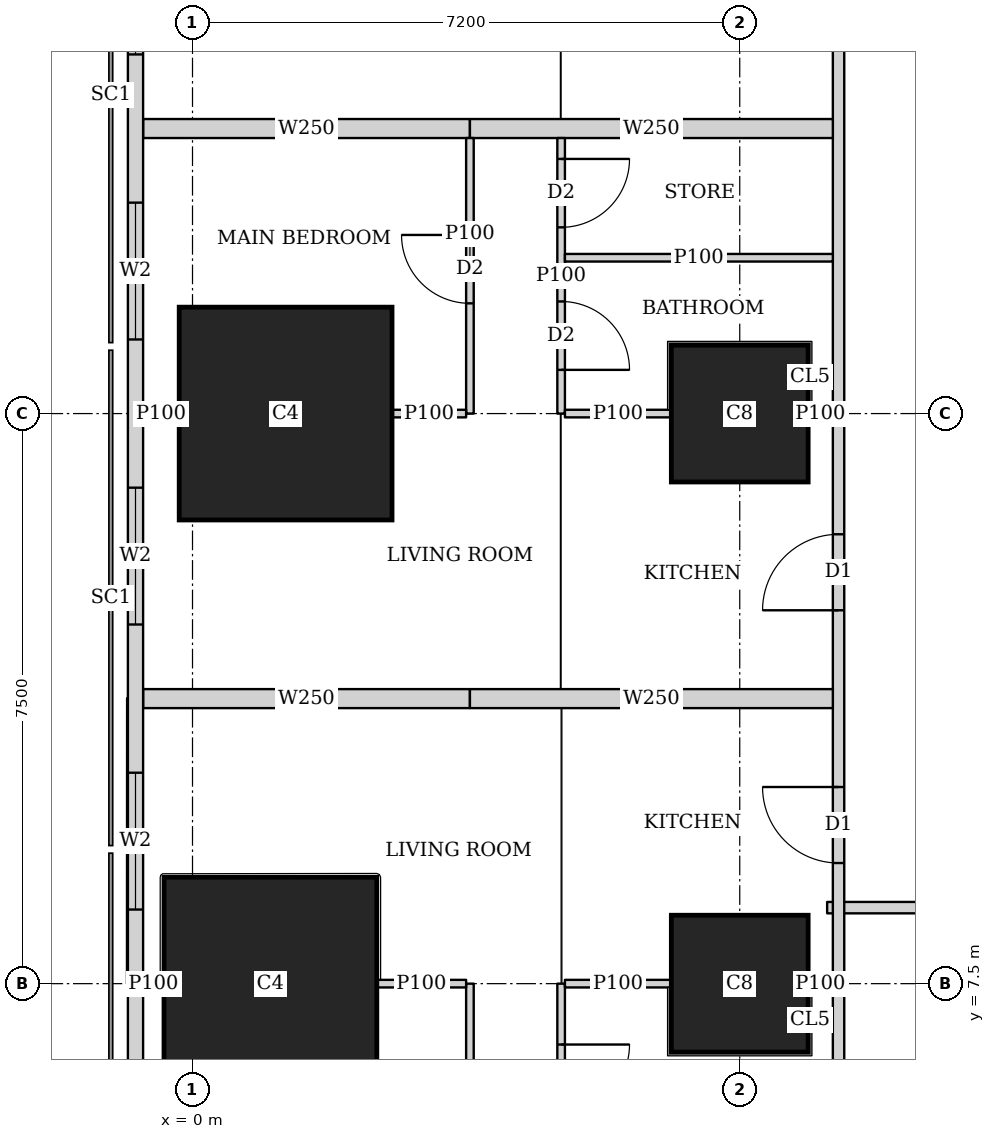
"""IFC4 building model, lengths in metres.
Left out: names, types, materials, properties, quantities, classifications, styles, units other than length and angle.
Written with IfcOpenShell. Run it as: python <this file> out.ifc"""

import sys

from ifc_helpers import new_model, si_unit, direction, frame, frame_2d, origin, origin_2d, place, context, subcontext, project, spatial, rectangle, extrude, element, fill, save


model = new_model("IFC4")
c1 = context("Model", 3, precision=1e-05, world=origin(), true_north=direction((0.0, 1.0)))
c2 = subcontext(c1, "Body", "Model", "MODEL_VIEW")
j1 = project(units=[si_unit("LENGTHUNIT", "METRE"), si_unit("PLANEANGLEUNIT", "RADIAN")], contexts=[c1])
p1 = place(None, origin())
s1 = spatial("IfcSite", under=j1, at=p1, CompositionType="ELEMENT")
p2 = place(p1, origin())
s2 = spatial("IfcBuilding", under=s1, at=p2, CompositionType="ELEMENT")
p3 = place(p2, frame((0.0, 0.0, 65.0)))
s3 = spatial("IfcBuildingStorey", under=s2, at=p3, CompositionType="ELEMENT", Elevation=65.0)
p4 = place(p3, frame((1.025, 7.5, 0.0), z_axis=(0.0, 0.0, 1.0), x_axis=(1.0, 0.0, 0.0)))
e1 = element("IfcColumn", 1, at=p4, inside=s3, PredefinedType="COLUMN", context=c2, shape_type="SweptSolid", body=[
    extrude(rectangle(XDim=2.8, YDim=2.8, at=origin_2d()), origin(), (0.0, 0.0, 1.0), 3.75),
])
p5 = place(p3, frame((7.2, 7.5, 0.0), z_axis=(0.0, 0.0, 1.0), x_axis=(1.0, 0.0, 0.0)))
e2 = element("IfcColumn", 2, at=p5, inside=s3, PredefinedType="COLUMN", context=c2, shape_type="SweptSolid", body=[
    extrude(rectangle(XDim=1.8, YDim=1.8, at=origin_2d()), origin(), (0.0, 0.0, 1.0), 3.75),
])
p6 = place(p3, frame((1.225, 15.0, 0.0), z_axis=(0.0, 0.0, 1.0), x_axis=(1.0, 0.0, 0.0)))
e3 = element("IfcColumn", 3, at=p6, inside=s3, PredefinedType="COLUMN", context=c2, shape_type="SweptSolid", body=[
    extrude(rectangle(XDim=2.8, YDim=2.8, at=origin_2d()), origin(), (0.0, 0.0, 1.0), 3.75),
])
p7 = place(p3, frame((7.2, 15.0, 0.0), z_axis=(0.0, 0.0, 1.0), x_axis=(1.0, 0.0, 0.0)))
e4 = element("IfcColumn", 4, at=p7, inside=s3, PredefinedType="COLUMN", context=c2, shape_type="SweptSolid", body=[
    extrude(rectangle(XDim=1.8, YDim=1.8, at=origin_2d()), origin(), (0.0, 0.0, 1.0), 3.75),
])
p8 = place(p3, frame((-0.75, 42.837, 0.0), z_axis=(0.0, 0.0, 1.0), x_axis=(0.0, -1.0, 0.0)))
e5 = element("IfcWall", 5, at=p8, inside=s3, PredefinedType="SOLIDWALL", context=c2, shape_type="SweptSolid", body=[
    extrude(rectangle(XDim=40.674, YDim=0.2, at=frame_2d((20.337, 0.0))), origin(), (0.0, 0.0, 1.0), 3.5),
])
p9 = place(p8, frame((1.78, 0.0, 0.9)))
e6 = element("IfcOpeningElement", 6, at=p9, cuts=e5, PredefinedType="OPENING", context=c2, shape_type="SweptSolid", body=[
    extrude(rectangle(XDim=1.8, YDim=1.5, at=frame_2d((0.9, 0.75))), frame((0.0, 0.11, 0.0), z_axis=(0.0, -1.0, 0.0), x_axis=(1.0, 0.0, 0.0)), (0.0, 0.0, 1.0), 0.22),
])
p10 = place(p8, frame((6.312, 0.0, 0.9)))
e7 = element("IfcOpeningElement", 7, at=p10, cuts=e5, PredefinedType="OPENING", context=c2, shape_type="SweptSolid", body=[
    extrude(rectangle(XDim=1.8, YDim=1.5, at=frame_2d((0.9, 0.75))), frame((0.0, 0.11, 0.0), z_axis=(0.0, -1.0, 0.0), x_axis=(1.0, 0.0, 0.0)), (0.0, 0.0, 1.0), 0.22),
])
p11 = place(p8, frame((10.062, 0.0, 0.9)))
e8 = element("IfcOpeningElement", 8, at=p11, cuts=e5, PredefinedType="OPENING", context=c2, shape_type="SweptSolid", body=[
    extrude(rectangle(XDim=1.8, YDim=1.5, at=frame_2d((0.9, 0.75))), frame((0.0, 0.11, 0.0), z_axis=(0.0, -1.0, 0.0), x_axis=(1.0, 0.0, 0.0)), (0.0, 0.0, 1.0), 0.22),
])
p12 = place(p8, frame((13.812, 0.0, 0.9)))
e9 = element("IfcOpeningElement", 9, at=p12, cuts=e5, PredefinedType="OPENING", context=c2, shape_type="SweptSolid", body=[
    extrude(rectangle(XDim=1.8, YDim=1.5, at=frame_2d((0.9, 0.75))), frame((0.0, 0.11, 0.0), z_axis=(0.0, -1.0, 0.0), x_axis=(1.0, 0.0, 0.0)), (0.0, 0.0, 1.0), 0.22),
])
p13 = place(p8, frame((17.562, 0.0, 0.9)))
e10 = element("IfcOpeningElement", 10, at=p13, cuts=e5, PredefinedType="OPENING", context=c2, shape_type="SweptSolid", body=[
    extrude(rectangle(XDim=1.8, YDim=1.5, at=frame_2d((0.9, 0.75))), frame((0.0, 0.11, 0.0), z_axis=(0.0, -1.0, 0.0), x_axis=(1.0, 0.0, 0.0)), (0.0, 0.0, 1.0), 0.22),
])
p14 = place(p8, frame((21.312, 0.0, 0.9)))
e11 = element("IfcOpeningElement", 11, at=p14, cuts=e5, PredefinedType="OPENING", context=c2, shape_type="SweptSolid", body=[
    extrude(rectangle(XDim=1.8, YDim=1.5, at=frame_2d((0.9, 0.75))), frame((0.0, 0.11, 0.0), z_axis=(0.0, -1.0, 0.0), x_axis=(1.0, 0.0, 0.0)), (0.0, 0.0, 1.0), 0.22),
])
p15 = place(p8, frame((25.062, 0.0, 0.9)))
e12 = element("IfcOpeningElement", 12, at=p15, cuts=e5, PredefinedType="OPENING", context=c2, shape_type="SweptSolid", body=[
    extrude(rectangle(XDim=1.8, YDim=1.5, at=frame_2d((0.9, 0.75))), frame((0.0, 0.11, 0.0), z_axis=(0.0, -1.0, 0.0), x_axis=(1.0, 0.0, 0.0)), (0.0, 0.0, 1.0), 0.22),
])
p16 = place(p8, frame((28.812, 0.0, 0.9)))
e13 = element("IfcOpeningElement", 13, at=p16, cuts=e5, PredefinedType="OPENING", context=c2, shape_type="SweptSolid", body=[
    extrude(rectangle(XDim=1.8, YDim=1.5, at=frame_2d((0.9, 0.75))), frame((0.0, 0.11, 0.0), z_axis=(0.0, -1.0, 0.0), x_axis=(1.0, 0.0, 0.0)), (0.0, 0.0, 1.0), 0.22),
])
p17 = place(p8, frame((32.562, 0.0, 0.9)))
e14 = element("IfcOpeningElement", 14, at=p17, cuts=e5, PredefinedType="OPENING", context=c2, shape_type="SweptSolid", body=[
    extrude(rectangle(XDim=1.8, YDim=1.5, at=frame_2d((0.9, 0.75))), frame((0.0, 0.11, 0.0), z_axis=(0.0, -1.0, 0.0), x_axis=(1.0, 0.0, 0.0)), (0.0, 0.0, 1.0), 0.22),
])
p18 = place(p8, frame((37.094, 0.0, 0.9)))
e15 = element("IfcOpeningElement", 15, at=p18, cuts=e5, PredefinedType="OPENING", context=c2, shape_type="SweptSolid", body=[
    extrude(rectangle(XDim=1.8, YDim=1.5, at=frame_2d((0.9, 0.75))), frame((0.0, 0.11, 0.0), z_axis=(0.0, -1.0, 0.0), x_axis=(1.0, 0.0, 0.0)), (0.0, 0.0, 1.0), 0.22),
])
p19 = place(p3, frame((8.5, 2.426, 0.0), z_axis=(0.0, 0.0, 1.0), x_axis=(0.0, 1.0, 0.0)))
e16 = element("IfcWall", 16, at=p19, inside=s3, PredefinedType="SOLIDWALL", context=c2, shape_type="SweptSolid", body=[
    extrude(rectangle(XDim=40.173, YDim=0.15, at=frame_2d((20.086, 0.0))), origin(), (0.0, 0.0, 1.0), 3.5),
])
p20 = place(p19, frame((6.661, 0.0, 0.0)))
e17 = element("IfcOpeningElement", 17, at=p20, cuts=e16, PredefinedType="OPENING", context=c2, shape_type="SweptSolid", body=[
    extrude(rectangle(XDim=1.0, YDim=2.1, at=frame_2d((0.5, 1.05))), frame((0.0, 0.085, 0.0), z_axis=(0.0, -1.0, 0.0), x_axis=(1.0, 0.0, 0.0)), (0.0, 0.0, 1.0), 0.17),
])
p21 = place(p19, frame((9.986, 0.0, 0.0)))
e18 = element("IfcOpeningElement", 18, at=p21, cuts=e16, PredefinedType="OPENING", context=c2, shape_type="SweptSolid", body=[
    extrude(rectangle(XDim=1.0, YDim=2.1, at=frame_2d((0.5, 1.05))), frame((0.0, 0.085, 0.0), z_axis=(0.0, -1.0, 0.0), x_axis=(1.0, 0.0, 0.0)), (0.0, 0.0, 1.0), 0.17),
])
p22 = place(p19, frame((17.487, 0.0, 0.0)))
e19 = element("IfcOpeningElement", 19, at=p22, cuts=e16, PredefinedType="OPENING", context=c2, shape_type="SweptSolid", body=[
    extrude(rectangle(XDim=1.0, YDim=2.1, at=frame_2d((0.5, 1.05))), frame((0.0, 0.085, 0.0), z_axis=(0.0, -1.0, 0.0), x_axis=(1.0, 0.0, 0.0)), (0.0, 0.0, 1.0), 0.17),
])
p23 = place(p19, frame((24.987, 0.0, 0.0)))
e20 = element("IfcOpeningElement", 20, at=p23, cuts=e16, PredefinedType="OPENING", context=c2, shape_type="SweptSolid", body=[
    extrude(rectangle(XDim=1.0, YDim=2.1, at=frame_2d((0.5, 1.05))), frame((0.0, 0.085, 0.0), z_axis=(0.0, -1.0, 0.0), x_axis=(1.0, 0.0, 0.0)), (0.0, 0.0, 1.0), 0.17),
])
p24 = place(p3, frame((40.054, 8.5, 0.0), z_axis=(0.0, 0.0, 1.0), x_axis=(-1.0, 0.0, 0.0)))
e21 = element("IfcWall", 21, at=p24, inside=s3, PredefinedType="SOLIDWALL", context=c2, shape_type="SweptSolid", body=[
    extrude(rectangle(XDim=31.704, YDim=0.15, at=frame_2d((15.852, 0.0))), origin(), (0.0, 0.0, 1.0), 3.5),
])
p25 = place(p24, frame((28.104, 0.0, 0.0)))
e22 = element("IfcOpeningElement", 22, at=p25, cuts=e21, PredefinedType="OPENING", context=c2, shape_type="SweptSolid", body=[
    extrude(rectangle(XDim=1.0, YDim=2.1, at=frame_2d((0.5, 1.05))), frame((0.0, 0.085, 0.0), z_axis=(0.0, -1.0, 0.0), x_axis=(1.0, 0.0, 0.0)), (0.0, 0.0, 1.0), 0.17),
])
p26 = place(p24, frame((19.755, 0.0, 0.0)))
e23 = element("IfcOpeningElement", 23, at=p26, cuts=e21, PredefinedType="OPENING", context=c2, shape_type="SweptSolid", body=[
    extrude(rectangle(XDim=1.0, YDim=2.1, at=frame_2d((0.5, 1.05))), frame((0.0, 0.085, 0.0), z_axis=(0.0, -1.0, 0.0), x_axis=(1.0, 0.0, 0.0)), (0.0, 0.0, 1.0), 0.17),
])
p27 = place(p24, frame((12.555, 0.0, 0.0)))
e24 = element("IfcOpeningElement", 24, at=p27, cuts=e21, PredefinedType="OPENING", context=c2, shape_type="SweptSolid", body=[
    extrude(rectangle(XDim=1.0, YDim=2.1, at=frame_2d((0.5, 1.05))), frame((0.0, 0.085, 0.0), z_axis=(0.0, -1.0, 0.0), x_axis=(1.0, 0.0, 0.0)), (0.0, 0.0, 1.0), 0.17),
])
p28 = place(p24, frame((5.355, 0.0, 0.0)))
e25 = element("IfcOpeningElement", 25, at=p28, cuts=e21, PredefinedType="OPENING", context=c2, shape_type="SweptSolid", body=[
    extrude(rectangle(XDim=1.0, YDim=2.1, at=frame_2d((0.5, 1.05))), frame((0.0, 0.085, 0.0), z_axis=(0.0, -1.0, 0.0), x_axis=(1.0, 0.0, 0.0)), (0.0, 0.0, 1.0), 0.17),
])
p29 = place(p3, frame((3.65, 3.787, 0.0), z_axis=(0.0, 0.0, 1.0), x_axis=(0.0, 1.0, 0.0)))
e26 = element("IfcWall", 26, at=p29, inside=s3, PredefinedType="PARTITIONING", context=c2, shape_type="SweptSolid", body=[
    extrude(rectangle(XDim=3.713, YDim=0.1, at=frame_2d((1.856, 0.0))), origin(), (0.0, 0.0, 1.0), 3.5),
])
p30 = place(p29, frame((1.4, 0.0, 0.0)))
e27 = element("IfcOpeningElement", 27, at=p30, cuts=e26, PredefinedType="OPENING", context=c2, shape_type="SweptSolid", body=[
    extrude(rectangle(XDim=0.9, YDim=2.1, at=frame_2d((0.45, 1.05))), frame((0.0, 0.06, 0.0), z_axis=(0.0, -1.0, 0.0), x_axis=(1.0, 0.0, 0.0)), (0.0, 0.0, 1.0), 0.12),
])
p31 = place(p3, frame((4.85, 3.018, 0.0), z_axis=(0.0, 0.0, 1.0), x_axis=(0.0, 1.0, 0.0)))
e28 = element("IfcWall", 28, at=p31, inside=s3, PredefinedType="PARTITIONING", context=c2, shape_type="SweptSolid", body=[
    extrude(rectangle(XDim=4.482, YDim=0.1, at=frame_2d((2.241, 0.0))), origin(), (0.0, 0.0, 1.0), 3.5),
])
p32 = place(p31, frame((2.781, 0.0, 0.0)))
e29 = element("IfcOpeningElement", 29, at=p32, cuts=e28, PredefinedType="OPENING", context=c2, shape_type="SweptSolid", body=[
    extrude(rectangle(XDim=0.9, YDim=2.1, at=frame_2d((0.45, 1.05))), frame((0.0, 0.06, 0.0), z_axis=(0.0, -1.0, 0.0), x_axis=(1.0, 0.0, 0.0)), (0.0, 0.0, 1.0), 0.12),
])
p33 = place(p3, frame((-0.65, 7.5, 0.0), z_axis=(0.0, 0.0, 1.0), x_axis=(1.0, 0.0, 0.0)))
e30 = element("IfcWall", 30, at=p33, inside=s3, PredefinedType="PARTITIONING", context=c2, shape_type="SweptSolid", body=[
    extrude(rectangle(XDim=0.274, YDim=0.1, at=frame_2d((0.137, 0.0))), origin(), (0.0, 0.0, 1.0), 3.5),
])
p34 = place(p3, frame((2.426, 7.5, 0.0), z_axis=(0.0, 0.0, 1.0), x_axis=(1.0, 0.0, 0.0)))
e31 = element("IfcWall", 31, at=p34, inside=s3, PredefinedType="PARTITIONING", context=c2, shape_type="SweptSolid", body=[
    extrude(rectangle(XDim=1.174, YDim=0.1, at=frame_2d((0.587, 0.0))), origin(), (0.0, 0.0, 1.0), 2.05),
])
p35 = place(p3, frame((4.9, 7.5, 0.0), z_axis=(0.0, 0.0, 1.0), x_axis=(1.0, 0.0, 0.0)))
e32 = element("IfcWall", 32, at=p35, inside=s3, PredefinedType="PARTITIONING", context=c2, shape_type="SweptSolid", body=[
    extrude(rectangle(XDim=1.399, YDim=0.1, at=frame_2d((0.7, 0.0))), origin(), (0.0, 0.0, 1.0), 3.5),
])
p36 = place(p3, frame((8.101, 7.5, 0.0), z_axis=(0.0, 0.0, 1.0), x_axis=(1.0, 0.0, 0.0)))
e33 = element("IfcWall", 33, at=p36, inside=s3, PredefinedType="PARTITIONING", context=c2, shape_type="SweptSolid", body=[
    extrude(rectangle(XDim=0.324, YDim=0.1, at=frame_2d((0.162, 0.0))), origin(), (0.0, 0.0, 1.0), 3.5),
])
p37 = place(p3, frame((3.65, 15.0, 0.0), z_axis=(0.0, 0.0, 1.0), x_axis=(0.0, 1.0, 0.0)))
e34 = element("IfcWall", 34, at=p37, inside=s3, PredefinedType="PARTITIONING", context=c2, shape_type="SweptSolid", body=[
    extrude(rectangle(XDim=3.625, YDim=0.1, at=frame_2d((1.812, 0.0))), origin(), (0.0, 0.0, 1.0), 3.5),
])
p38 = place(p37, frame((1.45, 0.0, 0.0)))
e35 = element("IfcOpeningElement", 35, at=p38, cuts=e34, PredefinedType="OPENING", context=c2, shape_type="SweptSolid", body=[
    extrude(rectangle(XDim=0.9, YDim=2.1, at=frame_2d((0.45, 1.05))), frame((0.0, 0.06, 0.0), z_axis=(0.0, -1.0, 0.0), x_axis=(1.0, 0.0, 0.0)), (0.0, 0.0, 1.0), 0.12),
])
p39 = place(p3, frame((4.85, 15.0, 0.0), z_axis=(0.0, 0.0, 1.0), x_axis=(0.0, 1.0, 0.0)))
e36 = element("IfcWall", 36, at=p39, inside=s3, PredefinedType="PARTITIONING", context=c2, shape_type="SweptSolid", body=[
    extrude(rectangle(XDim=3.625, YDim=0.1, at=frame_2d((1.812, 0.0))), origin(), (0.0, 0.0, 1.0), 3.5),
])
p40 = place(p39, frame((0.575, 0.0, 0.0)))
e37 = element("IfcOpeningElement", 37, at=p40, cuts=e36, PredefinedType="OPENING", context=c2, shape_type="SweptSolid", body=[
    extrude(rectangle(XDim=0.9, YDim=2.1, at=frame_2d((0.45, 1.05))), frame((0.0, 0.06, 0.0), z_axis=(0.0, -1.0, 0.0), x_axis=(1.0, 0.0, 0.0)), (0.0, 0.0, 1.0), 0.12),
])
p41 = place(p39, frame((2.45, 0.0, 0.0)))
e38 = element("IfcOpeningElement", 38, at=p41, cuts=e36, PredefinedType="OPENING", context=c2, shape_type="SweptSolid", body=[
    extrude(rectangle(XDim=0.9, YDim=2.1, at=frame_2d((0.45, 1.05))), frame((0.0, 0.06, 0.0), z_axis=(0.0, -1.0, 0.0), x_axis=(1.0, 0.0, 0.0)), (0.0, 0.0, 1.0), 0.12),
])
p42 = place(p3, frame((-0.65, 15.0, 0.0), z_axis=(0.0, 0.0, 1.0), x_axis=(1.0, 0.0, 0.0)))
e39 = element("IfcWall", 39, at=p42, inside=s3, PredefinedType="PARTITIONING", context=c2, shape_type="SweptSolid", body=[
    extrude(rectangle(XDim=0.474, YDim=0.1, at=frame_2d((0.237, 0.0))), origin(), (0.0, 0.0, 1.0), 3.5),
])
p43 = place(p3, frame((2.626, 15.0, 0.0), z_axis=(0.0, 0.0, 1.0), x_axis=(1.0, 0.0, 0.0)))
e40 = element("IfcWall", 40, at=p43, inside=s3, PredefinedType="PARTITIONING", context=c2, shape_type="SweptSolid", body=[
    extrude(rectangle(XDim=0.974, YDim=0.1, at=frame_2d((0.487, 0.0))), origin(), (0.0, 0.0, 1.0), 3.5),
])
p44 = place(p3, frame((4.9, 15.0, 0.0), z_axis=(0.0, 0.0, 1.0), x_axis=(1.0, 0.0, 0.0)))
e41 = element("IfcWall", 41, at=p44, inside=s3, PredefinedType="PARTITIONING", context=c2, shape_type="SweptSolid", body=[
    extrude(rectangle(XDim=1.399, YDim=0.1, at=frame_2d((0.7, 0.0))), origin(), (0.0, 0.0, 1.0), 3.5),
])
p45 = place(p3, frame((8.101, 15.0, 0.0), z_axis=(0.0, 0.0, 1.0), x_axis=(1.0, 0.0, 0.0)))
e42 = element("IfcWall", 42, at=p45, inside=s3, PredefinedType="PARTITIONING", context=c2, shape_type="SweptSolid", body=[
    extrude(rectangle(XDim=0.324, YDim=0.1, at=frame_2d((0.162, 0.0))), origin(), (0.0, 0.0, 1.0), 3.5),
])
p46 = place(p3, frame((4.9, 17.05, 0.0), z_axis=(0.0, 0.0, 1.0), x_axis=(1.0, 0.0, 0.0)))
e43 = element("IfcWall", 43, at=p46, inside=s3, PredefinedType="PARTITIONING", context=c2, shape_type="SweptSolid", body=[
    extrude(rectangle(XDim=3.525, YDim=0.1, at=frame_2d((1.763, 0.0))), origin(), (0.0, 0.0, 1.0), 3.5),
])
p47 = place(p3, frame((-0.65, 11.25, 0.0), z_axis=(0.0, 0.0, 1.0), x_axis=(1.0, 0.0, 0.0)))
e44 = element("IfcWall", 44, at=p47, inside=s3, PredefinedType="SOLIDWALL", context=c2, shape_type="SweptSolid", body=[
    extrude(rectangle(XDim=4.3, YDim=0.25, at=frame_2d((2.15, 0.0))), origin(), (0.0, 0.0, 1.0), 2.05),
])
p48 = place(p3, frame((3.65, 11.25, 0.0), z_axis=(0.0, 0.0, 1.0), x_axis=(1.0, 0.0, 0.0)))
e45 = element("IfcWall", 45, at=p48, inside=s3, PredefinedType="SOLIDWALL", context=c2, shape_type="SweptSolid", body=[
    extrude(rectangle(XDim=4.775, YDim=0.25, at=frame_2d((2.388, 0.0))), origin(), (0.0, 0.0, 1.0), 3.5),
])
p49 = place(p3, frame((-0.65, 18.75, 0.0), z_axis=(0.0, 0.0, 1.0), x_axis=(1.0, 0.0, 0.0)))
e46 = element("IfcWall", 46, at=p49, inside=s3, PredefinedType="SOLIDWALL", context=c2, shape_type="SweptSolid", body=[
    extrude(rectangle(XDim=4.3, YDim=0.25, at=frame_2d((2.15, 0.0))), origin(), (0.0, 0.0, 1.0), 2.05),
])
p50 = place(p3, frame((3.65, 18.75, 0.0), z_axis=(0.0, 0.0, 1.0), x_axis=(1.0, 0.0, 0.0)))
e47 = element("IfcWall", 47, at=p50, inside=s3, PredefinedType="SOLIDWALL", context=c2, shape_type="SweptSolid", body=[
    extrude(rectangle(XDim=4.775, YDim=0.25, at=frame_2d((2.388, 0.0))), origin(), (0.0, 0.0, 1.0), 3.5),
])
p51 = place(p14, origin())
e48 = element("IfcWindow", 48, at=p51, inside=s3, PartitioningType="SINGLE_PANEL", PredefinedType="WINDOW", context=c2, shape_type="SweptSolid", body=[
    extrude(rectangle(XDim=1.8, YDim=1.5, at=frame_2d((0.9, 0.75))), frame((0.0, 0.03, 0.0), z_axis=(0.0, -1.0, 0.0), x_axis=(1.0, 0.0, 0.0)), (0.0, 0.0, 1.0), 0.06),
])
fill(e11, e48)
p52 = place(p15, origin())
e49 = element("IfcWindow", 49, at=p52, inside=s3, PartitioningType="SINGLE_PANEL", PredefinedType="WINDOW", context=c2, shape_type="SweptSolid", body=[
    extrude(rectangle(XDim=1.8, YDim=1.5, at=frame_2d((0.9, 0.75))), frame((0.0, 0.03, 0.0), z_axis=(0.0, -1.0, 0.0), x_axis=(1.0, 0.0, 0.0)), (0.0, 0.0, 1.0), 0.06),
])
fill(e12, e49)
p53 = place(p16, origin())
e50 = element("IfcWindow", 50, at=p53, inside=s3, PartitioningType="SINGLE_PANEL", PredefinedType="WINDOW", context=c2, shape_type="SweptSolid", body=[
    extrude(rectangle(XDim=1.8, YDim=1.5, at=frame_2d((0.9, 0.75))), frame((0.0, 0.03, 0.0), z_axis=(0.0, -1.0, 0.0), x_axis=(1.0, 0.0, 0.0)), (0.0, 0.0, 1.0), 0.06),
])
fill(e13, e50)
p54 = place(p17, origin())
e51 = element("IfcWindow", 51, at=p54, inside=s3, PartitioningType="SINGLE_PANEL", PredefinedType="WINDOW", context=c2, shape_type="SweptSolid", body=[
    extrude(rectangle(XDim=1.8, YDim=1.5, at=frame_2d((0.9, 0.75))), frame((0.0, 0.03, 0.0), z_axis=(0.0, -1.0, 0.0), x_axis=(1.0, 0.0, 0.0)), (0.0, 0.0, 1.0), 0.06),
])
fill(e14, e51)
p55 = place(p32, origin())
e52 = element("IfcDoor", 52, at=p55, inside=s3, OperationType="SINGLE_SWING_LEFT", PredefinedType="DOOR", context=c2, shape_type="SweptSolid", body=[
    extrude(rectangle(XDim=0.9, YDim=2.1, at=frame_2d((0.45, 1.05))), frame((0.0, 0.025, 0.0), z_axis=(0.0, -1.0, 0.0), x_axis=(1.0, 0.0, 0.0)), (0.0, 0.0, 1.0), 0.05),
])
fill(e29, e52)
p56 = place(p20, origin())
e53 = element("IfcDoor", 53, at=p56, inside=s3, OperationType="SINGLE_SWING_RIGHT", PredefinedType="DOOR", context=c2, shape_type="SweptSolid", body=[
    extrude(rectangle(XDim=1.0, YDim=2.1, at=frame_2d((0.5, 1.05))), frame((0.0, 0.025, 0.0), z_axis=(0.0, -1.0, 0.0), x_axis=(1.0, 0.0, 0.0)), (0.0, 0.0, 1.0), 0.05),
])
fill(e17, e53)
p57 = place(p38, origin())
e54 = element("IfcDoor", 54, at=p57, inside=s3, OperationType="SINGLE_SWING_RIGHT", PredefinedType="DOOR", context=c2, shape_type="SweptSolid", body=[
    extrude(rectangle(XDim=0.9, YDim=2.1, at=frame_2d((0.45, 1.05))), frame((0.0, 0.025, 0.0), z_axis=(0.0, -1.0, 0.0), x_axis=(1.0, 0.0, 0.0)), (0.0, 0.0, 1.0), 0.05),
])
fill(e35, e54)
p58 = place(p40, origin())
e55 = element("IfcDoor", 55, at=p58, inside=s3, OperationType="SINGLE_SWING_RIGHT", PredefinedType="DOOR", context=c2, shape_type="SweptSolid", body=[
    extrude(rectangle(XDim=0.9, YDim=2.1, at=frame_2d((0.45, 1.05))), frame((0.0, 0.025, 0.0), z_axis=(0.0, -1.0, 0.0), x_axis=(1.0, 0.0, 0.0)), (0.0, 0.0, 1.0), 0.05),
])
fill(e37, e55)
p59 = place(p41, origin())
e56 = element("IfcDoor", 56, at=p59, inside=s3, OperationType="SINGLE_SWING_LEFT", PredefinedType="DOOR", context=c2, shape_type="SweptSolid", body=[
    extrude(rectangle(XDim=0.9, YDim=2.1, at=frame_2d((0.45, 1.05))), frame((0.0, 0.025, 0.0), z_axis=(0.0, -1.0, 0.0), x_axis=(1.0, 0.0, 0.0)), (0.0, 0.0, 1.0), 0.05),
])
fill(e38, e56)
p60 = place(p21, origin())
e57 = element("IfcDoor", 57, at=p60, inside=s3, OperationType="SINGLE_SWING_LEFT", PredefinedType="DOOR", context=c2, shape_type="SweptSolid", body=[
    extrude(rectangle(XDim=1.0, YDim=2.1, at=frame_2d((0.5, 1.05))), frame((0.0, 0.025, 0.0), z_axis=(0.0, -1.0, 0.0), x_axis=(1.0, 0.0, 0.0)), (0.0, 0.0, 1.0), 0.05),
])
fill(e18, e57)
save(model, sys.argv[1])
